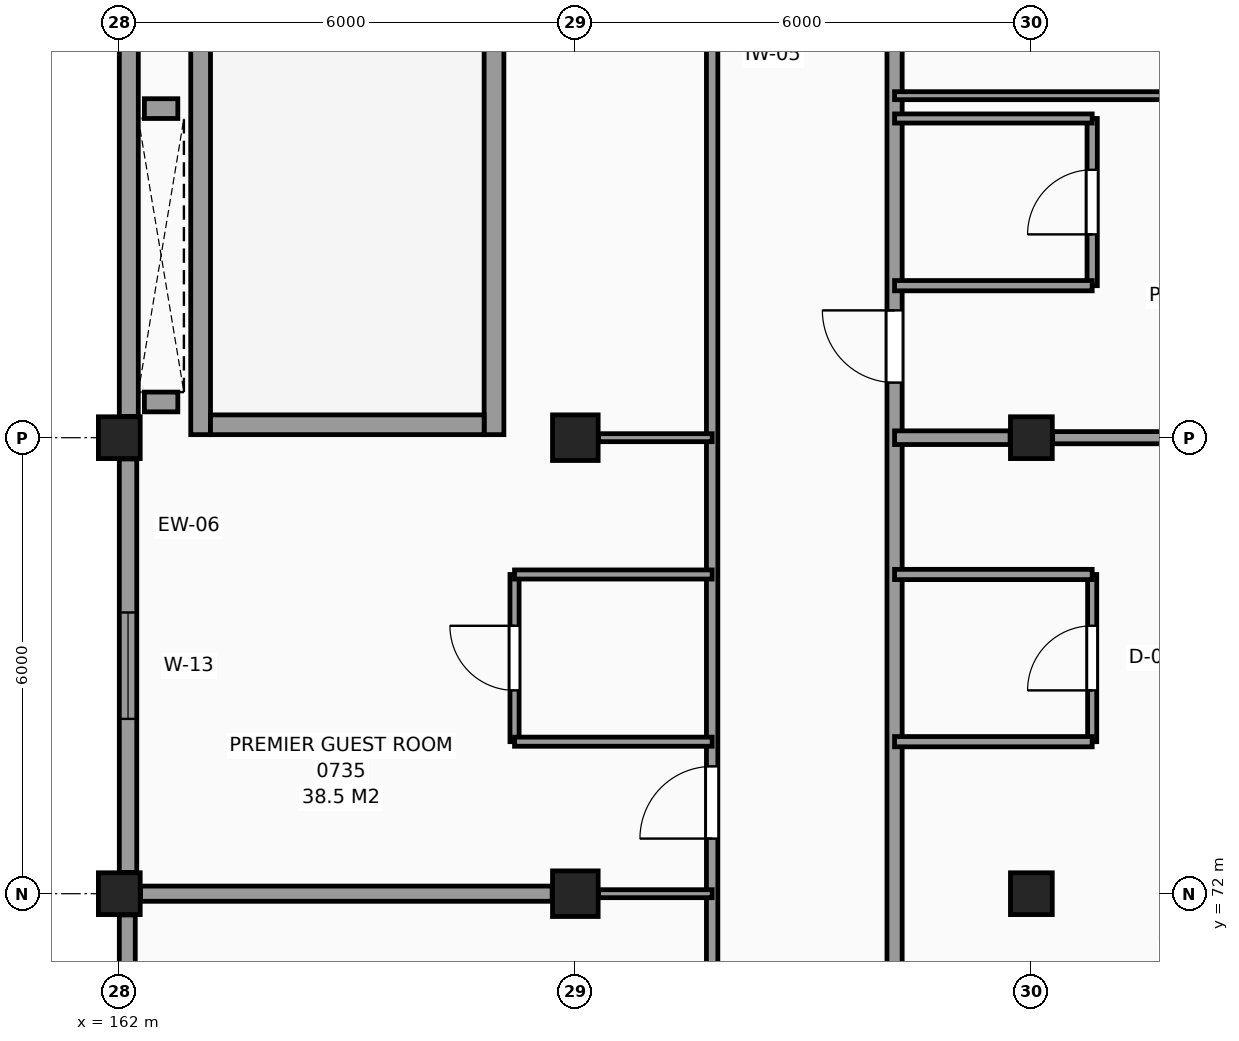
"""IFC4 building model, lengths in metres.
Left out: names, types, materials, properties, quantities, classifications, styles, units other than length and angle.
Written with IfcOpenShell. Run it as: python <this file> out.ifc"""

import sys

from ifc_helpers import new_model, si_unit, direction, frame, frame_2d, origin, origin_2d, place, context, subcontext, project, spatial, rectangle, extrude, element, fill, save


model = new_model("IFC4")
c1 = context("Model", 3, precision=1e-05, world=origin(), true_north=direction((0.0, 1.0)))
c2 = subcontext(c1, "Body", "Model", "MODEL_VIEW")
j1 = project(units=[si_unit("LENGTHUNIT", "METRE"), si_unit("PLANEANGLEUNIT", "RADIAN")], contexts=[c1])
p1 = place(None, origin())
s1 = spatial("IfcSite", under=j1, at=p1, CompositionType="ELEMENT")
p2 = place(p1, origin())
s2 = spatial("IfcBuilding", under=s1, at=p2, CompositionType="ELEMENT")
p3 = place(p2, frame((0.0, 0.0, 31.5)))
s3 = spatial("IfcBuildingStorey", under=s2, at=p3, CompositionType="ELEMENT", Elevation=31.5)
for number, where, z_axis, x_axis in (
    (1, (162.0, 72.0, 0.0), (0.0, 0.0, 1.0), (1.0, 0.0, 0.0)),
    (2, (162.0, 78.0, 0.0), (0.0, 0.0, 1.0), (1.0, 0.0, 0.0)),
):
    element("IfcColumn", number, at=place(p3, frame(where, z_axis=z_axis, x_axis=x_axis)), inside=s3, PredefinedType="COLUMN", context=c2, shape_type="SweptSolid", body=[
        extrude(rectangle(XDim=0.55, YDim=0.55, at=origin_2d()), origin(), (0.0, 0.0, 1.0), 3.3),
    ])
for number, where, z_axis, x_axis in (
    (3, (168.0, 72.0, 0.0), (0.0, 0.0, 1.0), (1.0, 0.0, 0.0)),
    (4, (168.0, 78.0, 0.0), (0.0, 0.0, 1.0), (1.0, 0.0, 0.0)),
):
    element("IfcColumn", number, at=place(p3, frame(where, z_axis=z_axis, x_axis=x_axis)), inside=s3, PredefinedType="COLUMN", context=c2, shape_type="SweptSolid", body=[
        extrude(rectangle(XDim=0.6, YDim=0.6, at=origin_2d()), origin(), (0.0, 0.0, 1.0), 3.3),
    ])
for number, where, z_axis, x_axis in (
    (5, (174.0, 72.0, 0.0), (0.0, 0.0, 1.0), (1.0, 0.0, 0.0)),
    (6, (174.0, 78.0, 0.0), (0.0, 0.0, 1.0), (1.0, 0.0, 0.0)),
):
    element("IfcColumn", number, at=place(p3, frame(where, z_axis=z_axis, x_axis=x_axis)), inside=s3, PredefinedType="COLUMN", context=c2, shape_type="SweptSolid", body=[
        extrude(rectangle(XDim=0.55, YDim=0.55, at=origin_2d()), origin(), (0.0, 0.0, 1.0), 3.3),
    ])
p4 = place(p3, frame((162.125, 83.72, 0.0), z_axis=(0.0, 0.0, 1.0), x_axis=(0.0, -1.0, 0.0)))
e7 = element("IfcWall", 7, at=p4, inside=s3, PredefinedType="SOLIDWALL", context=c2, shape_type="SweptSolid", body=[
    extrude(rectangle(XDim=5.44, YDim=0.25, at=frame_2d((2.72, 0.0))), origin(), (0.0, 0.0, 1.0), 3.07),
])
p5 = place(p3, frame((162.115, 77.72, 0.0), z_axis=(0.0, 0.0, 1.0), x_axis=(0.0, -1.0, 0.0)))
e8 = element("IfcWall", 8, at=p5, inside=s3, PredefinedType="SOLIDWALL", context=c2, shape_type="SweptSolid", body=[
    extrude(rectangle(XDim=5.44, YDim=0.23, at=frame_2d((2.72, 0.0))), origin(), (0.0, 0.0, 1.0), 2.42),
])
p6 = place(p5, frame((2.02, 0.0, 0.8)))
e9 = element("IfcOpeningElement", 9, at=p6, cuts=e8, PredefinedType="OPENING", context=c2, shape_type="SweptSolid", body=[
    extrude(rectangle(XDim=1.4, YDim=1.4, at=frame_2d((0.7, 0.7))), frame((0.0, 0.125, 0.0), z_axis=(0.0, -1.0, 0.0), x_axis=(1.0, 0.0, 0.0)), (0.0, 0.0, 1.0), 0.25),
])
p7 = place(p3, frame((162.105, 71.72, 0.0), z_axis=(0.0, 0.0, 1.0), x_axis=(0.0, -1.0, 0.0)))
e10 = element("IfcWall", 10, at=p7, inside=s3, PredefinedType="SOLIDWALL", context=c2, shape_type="SweptSolid", body=[
    extrude(rectangle(XDim=5.44, YDim=0.21, at=frame_2d((2.72, 0.0))), origin(), (0.0, 0.0, 1.0), 2.42),
])
p8 = place(p7, frame((2.02, 0.0, 0.8)))
e11 = element("IfcOpeningElement", 11, at=p8, cuts=e10, PredefinedType="OPENING", context=c2, shape_type="SweptSolid", body=[
    extrude(rectangle(XDim=1.4, YDim=1.4, at=frame_2d((0.7, 0.7))), frame((0.0, 0.115, 0.0), z_axis=(0.0, -1.0, 0.0), x_axis=(1.0, 0.0, 0.0)), (0.0, 0.0, 1.0), 0.23),
])
for number, where, z_axis, x_axis in (
    (12, (163.07, 78.04, 0.0), (0.0, 0.0, 1.0), (0.0, 1.0, 0.0)),
    (13, (166.93, 78.04, 0.0), (0.0, 0.0, 1.0), (0.0, 1.0, 0.0)),
):
    element("IfcWall", number, at=place(p3, frame(where, z_axis=z_axis, x_axis=x_axis)), inside=s3, PredefinedType="SHEAR", context=c2, shape_type="SweptSolid", body=[
        extrude(rectangle(XDim=10.72, YDim=0.26, at=frame_2d((5.36, 0.0))), origin(), (0.0, 0.0, 1.0), 3.3),
    ])
p9 = place(p3, frame((163.2, 78.17, 0.0), z_axis=(0.0, 0.0, 1.0), x_axis=(1.0, 0.0, 0.0)))
e14 = element("IfcWall", 14, at=p9, inside=s3, PredefinedType="SHEAR", context=c2, shape_type="SweptSolid", body=[
    extrude(rectangle(XDim=3.6, YDim=0.26, at=frame_2d((1.8, 0.0))), origin(), (0.0, 0.0, 1.0), 3.3),
])
for number, where, z_axis, x_axis in (
    (15, (162.33, 78.47, 0.0), (0.0, 0.0, 1.0), (1.0, 0.0, 0.0)),
    (16, (162.33, 82.33, 0.0), (0.0, 0.0, 1.0), (1.0, 0.0, 0.0)),
):
    element("IfcWall", number, at=place(p3, frame(where, z_axis=z_axis, x_axis=x_axis)), inside=s3, PredefinedType="SHEAR", context=c2, shape_type="SweptSolid", body=[
        extrude(rectangle(XDim=0.44, YDim=0.26, at=frame_2d((0.22, 0.0))), origin(), (0.0, 0.0, 1.0), 3.3),
    ])
p10 = place(p3, frame((167.2, 74.0, 0.0), z_axis=(0.0, 0.0, 1.0), x_axis=(0.0, 1.0, 0.0)))
e17 = element("IfcWall", 17, at=p10, inside=s3, PredefinedType="PARTITIONING", context=c2, shape_type="SweptSolid", body=[
    extrude(rectangle(XDim=2.2, YDim=0.12, at=frame_2d((1.1, 0.0))), origin(), (0.0, 0.0, 1.0), 3.07),
])
p11 = place(p10, frame((0.675, 0.0, 0.0)))
e18 = element("IfcOpeningElement", 18, at=p11, cuts=e17, PredefinedType="OPENING", context=c2, shape_type="SweptSolid", body=[
    extrude(rectangle(XDim=0.85, YDim=2.1, at=frame_2d((0.425, 1.05))), frame((0.0, 0.07, 0.0), z_axis=(0.0, -1.0, 0.0), x_axis=(1.0, 0.0, 0.0)), (0.0, 0.0, 1.0), 0.14),
])
p12 = place(p3, frame((169.8, 42.255, 0.0), z_axis=(0.0, 0.0, 1.0), x_axis=(0.0, 1.0, 0.0)))
e19 = element("IfcWall", 19, at=p12, inside=s3, PredefinedType="PARTITIONING", context=c2, shape_type="SweptSolid", body=[
    extrude(rectangle(XDim=65.565, YDim=0.15, at=frame_2d((32.783, 0.0))), origin(), (0.0, 0.0, 1.0), 3.07),
])
p13 = place(p12, frame((50.145, 0.0, 0.0)))
e20 = element("IfcOpeningElement", 20, at=p13, cuts=e19, PredefinedType="OPENING", context=c2, shape_type="SweptSolid", body=[
    extrude(rectangle(XDim=1.2, YDim=2.2, at=frame_2d((0.6, 1.1))), frame((0.0, 0.085, 0.0), z_axis=(0.0, -1.0, 0.0), x_axis=(1.0, 0.0, 0.0)), (0.0, 0.0, 1.0), 0.17),
])
p14 = place(p12, frame((0.42, 0.0, 0.0)))
e21 = element("IfcOpeningElement", 21, at=p14, cuts=e19, PredefinedType="OPENING", context=c2, shape_type="SweptSolid", body=[
    extrude(rectangle(XDim=0.95, YDim=2.1, at=frame_2d((0.475, 1.05))), frame((0.0, 0.085, 0.0), z_axis=(0.0, -1.0, 0.0), x_axis=(1.0, 0.0, 0.0)), (0.0, 0.0, 1.0), 0.17),
])
p15 = place(p12, frame((6.47, 0.0, 0.0)))
e22 = element("IfcOpeningElement", 22, at=p15, cuts=e19, PredefinedType="OPENING", context=c2, shape_type="SweptSolid", body=[
    extrude(rectangle(XDim=0.95, YDim=2.1, at=frame_2d((0.475, 1.05))), frame((0.0, 0.085, 0.0), z_axis=(0.0, -1.0, 0.0), x_axis=(1.0, 0.0, 0.0)), (0.0, 0.0, 1.0), 0.17),
])
p16 = place(p12, frame((12.47, 0.0, 0.0)))
e23 = element("IfcOpeningElement", 23, at=p16, cuts=e19, PredefinedType="OPENING", context=c2, shape_type="SweptSolid", body=[
    extrude(rectangle(XDim=0.95, YDim=2.1, at=frame_2d((0.475, 1.05))), frame((0.0, 0.085, 0.0), z_axis=(0.0, -1.0, 0.0), x_axis=(1.0, 0.0, 0.0)), (0.0, 0.0, 1.0), 0.17),
])
p17 = place(p12, frame((18.47, 0.0, 0.0)))
e24 = element("IfcOpeningElement", 24, at=p17, cuts=e19, PredefinedType="OPENING", context=c2, shape_type="SweptSolid", body=[
    extrude(rectangle(XDim=0.95, YDim=2.1, at=frame_2d((0.475, 1.05))), frame((0.0, 0.085, 0.0), z_axis=(0.0, -1.0, 0.0), x_axis=(1.0, 0.0, 0.0)), (0.0, 0.0, 1.0), 0.17),
])
p18 = place(p12, frame((24.47, 0.0, 0.0)))
e25 = element("IfcOpeningElement", 25, at=p18, cuts=e19, PredefinedType="OPENING", context=c2, shape_type="SweptSolid", body=[
    extrude(rectangle(XDim=0.95, YDim=2.1, at=frame_2d((0.475, 1.05))), frame((0.0, 0.085, 0.0), z_axis=(0.0, -1.0, 0.0), x_axis=(1.0, 0.0, 0.0)), (0.0, 0.0, 1.0), 0.17),
])
p19 = place(p12, frame((30.47, 0.0, 0.0)))
e26 = element("IfcOpeningElement", 26, at=p19, cuts=e19, PredefinedType="OPENING", context=c2, shape_type="SweptSolid", body=[
    extrude(rectangle(XDim=0.95, YDim=2.1, at=frame_2d((0.475, 1.05))), frame((0.0, 0.085, 0.0), z_axis=(0.0, -1.0, 0.0), x_axis=(1.0, 0.0, 0.0)), (0.0, 0.0, 1.0), 0.17),
])
p20 = place(p12, frame((54.47, 0.0, 0.0)))
e27 = element("IfcOpeningElement", 27, at=p20, cuts=e19, PredefinedType="OPENING", context=c2, shape_type="SweptSolid", body=[
    extrude(rectangle(XDim=0.95, YDim=2.1, at=frame_2d((0.475, 1.05))), frame((0.0, 0.085, 0.0), z_axis=(0.0, -1.0, 0.0), x_axis=(1.0, 0.0, 0.0)), (0.0, 0.0, 1.0), 0.17),
])
p21 = place(p12, frame((60.47, 0.0, 0.0)))
e28 = element("IfcOpeningElement", 28, at=p21, cuts=e19, PredefinedType="OPENING", context=c2, shape_type="SweptSolid", body=[
    extrude(rectangle(XDim=0.95, YDim=2.1, at=frame_2d((0.475, 1.05))), frame((0.0, 0.085, 0.0), z_axis=(0.0, -1.0, 0.0), x_axis=(1.0, 0.0, 0.0)), (0.0, 0.0, 1.0), 0.17),
])
p22 = place(p3, frame((172.2, 42.255, 0.0), z_axis=(0.0, 0.0, 1.0), x_axis=(0.0, 1.0, 0.0)))
e29 = element("IfcWall", 29, at=p22, inside=s3, PredefinedType="PARTITIONING", context=c2, shape_type="SweptSolid", body=[
    extrude(rectangle(XDim=65.565, YDim=0.2, at=frame_2d((32.783, 0.0))), origin(), (0.0, 0.0, 1.0), 3.07),
])
p23 = place(p22, frame((0.42, 0.0, 0.0)))
e30 = element("IfcOpeningElement", 30, at=p23, cuts=e29, PredefinedType="OPENING", context=c2, shape_type="SweptSolid", body=[
    extrude(rectangle(XDim=0.95, YDim=2.1, at=frame_2d((0.475, 1.05))), frame((0.0, 0.11, 0.0), z_axis=(0.0, -1.0, 0.0), x_axis=(1.0, 0.0, 0.0)), (0.0, 0.0, 1.0), 0.22),
])
p24 = place(p22, frame((6.47, 0.0, 0.0)))
e31 = element("IfcOpeningElement", 31, at=p24, cuts=e29, PredefinedType="OPENING", context=c2, shape_type="SweptSolid", body=[
    extrude(rectangle(XDim=0.95, YDim=2.1, at=frame_2d((0.475, 1.05))), frame((0.0, 0.11, 0.0), z_axis=(0.0, -1.0, 0.0), x_axis=(1.0, 0.0, 0.0)), (0.0, 0.0, 1.0), 0.22),
])
p25 = place(p22, frame((16.27, 0.0, 0.0)))
e32 = element("IfcOpeningElement", 32, at=p25, cuts=e29, PredefinedType="OPENING", context=c2, shape_type="SweptSolid", body=[
    extrude(rectangle(XDim=0.95, YDim=2.1, at=frame_2d((0.475, 1.05))), frame((0.0, 0.11, 0.0), z_axis=(0.0, -1.0, 0.0), x_axis=(1.0, 0.0, 0.0)), (0.0, 0.0, 1.0), 0.22),
])
p26 = place(p22, frame((18.47, 0.0, 0.0)))
e33 = element("IfcOpeningElement", 33, at=p26, cuts=e29, PredefinedType="OPENING", context=c2, shape_type="SweptSolid", body=[
    extrude(rectangle(XDim=0.95, YDim=2.1, at=frame_2d((0.475, 1.05))), frame((0.0, 0.11, 0.0), z_axis=(0.0, -1.0, 0.0), x_axis=(1.0, 0.0, 0.0)), (0.0, 0.0, 1.0), 0.22),
])
p27 = place(p22, frame((22.87, 0.0, 0.0)))
e34 = element("IfcOpeningElement", 34, at=p27, cuts=e29, PredefinedType="OPENING", context=c2, shape_type="SweptSolid", body=[
    extrude(rectangle(XDim=0.95, YDim=2.1, at=frame_2d((0.475, 1.05))), frame((0.0, 0.11, 0.0), z_axis=(0.0, -1.0, 0.0), x_axis=(1.0, 0.0, 0.0)), (0.0, 0.0, 1.0), 0.22),
])
p28 = place(p22, frame((27.37, 0.0, 0.0)))
e35 = element("IfcOpeningElement", 35, at=p28, cuts=e29, PredefinedType="OPENING", context=c2, shape_type="SweptSolid", body=[
    extrude(rectangle(XDim=0.95, YDim=2.1, at=frame_2d((0.475, 1.05))), frame((0.0, 0.11, 0.0), z_axis=(0.0, -1.0, 0.0), x_axis=(1.0, 0.0, 0.0)), (0.0, 0.0, 1.0), 0.22),
])
p29 = place(p22, frame((36.47, 0.0, 0.0)))
e36 = element("IfcOpeningElement", 36, at=p29, cuts=e29, PredefinedType="OPENING", context=c2, shape_type="SweptSolid", body=[
    extrude(rectangle(XDim=0.95, YDim=2.1, at=frame_2d((0.475, 1.05))), frame((0.0, 0.11, 0.0), z_axis=(0.0, -1.0, 0.0), x_axis=(1.0, 0.0, 0.0)), (0.0, 0.0, 1.0), 0.22),
])
p30 = place(p22, frame((40.87, 0.0, 0.0)))
e37 = element("IfcOpeningElement", 37, at=p30, cuts=e29, PredefinedType="OPENING", context=c2, shape_type="SweptSolid", body=[
    extrude(rectangle(XDim=0.95, YDim=2.1, at=frame_2d((0.475, 1.05))), frame((0.0, 0.11, 0.0), z_axis=(0.0, -1.0, 0.0), x_axis=(1.0, 0.0, 0.0)), (0.0, 0.0, 1.0), 0.22),
])
p31 = place(p22, frame((48.07, 0.0, 0.0)))
e38 = element("IfcOpeningElement", 38, at=p31, cuts=e29, PredefinedType="OPENING", context=c2, shape_type="SweptSolid", body=[
    extrude(rectangle(XDim=0.95, YDim=2.1, at=frame_2d((0.475, 1.05))), frame((0.0, 0.11, 0.0), z_axis=(0.0, -1.0, 0.0), x_axis=(1.0, 0.0, 0.0)), (0.0, 0.0, 1.0), 0.22),
])
p32 = place(p22, frame((56.32, 0.0, 0.0)))
e39 = element("IfcOpeningElement", 39, at=p32, cuts=e29, PredefinedType="OPENING", context=c2, shape_type="SweptSolid", body=[
    extrude(rectangle(XDim=0.95, YDim=2.1, at=frame_2d((0.475, 1.05))), frame((0.0, 0.11, 0.0), z_axis=(0.0, -1.0, 0.0), x_axis=(1.0, 0.0, 0.0)), (0.0, 0.0, 1.0), 0.22),
])
p33 = place(p22, frame((60.47, 0.0, 0.0)))
e40 = element("IfcOpeningElement", 40, at=p33, cuts=e29, PredefinedType="OPENING", context=c2, shape_type="SweptSolid", body=[
    extrude(rectangle(XDim=0.95, YDim=2.1, at=frame_2d((0.475, 1.05))), frame((0.0, 0.11, 0.0), z_axis=(0.0, -1.0, 0.0), x_axis=(1.0, 0.0, 0.0)), (0.0, 0.0, 1.0), 0.22),
])
p34 = place(p3, frame((174.8, 74.0, 0.0), z_axis=(0.0, 0.0, 1.0), x_axis=(0.0, 1.0, 0.0)))
e41 = element("IfcWall", 41, at=p34, inside=s3, PredefinedType="PARTITIONING", context=c2, shape_type="SweptSolid", body=[
    extrude(rectangle(XDim=2.2, YDim=0.12, at=frame_2d((1.1, 0.0))), origin(), (0.0, 0.0, 1.0), 3.07),
])
p35 = place(p34, frame((0.675, 0.0, 0.0)))
e42 = element("IfcOpeningElement", 42, at=p35, cuts=e41, PredefinedType="OPENING", context=c2, shape_type="SweptSolid", body=[
    extrude(rectangle(XDim=0.85, YDim=2.1, at=frame_2d((0.425, 1.05))), frame((0.0, 0.07, 0.0), z_axis=(0.0, -1.0, 0.0), x_axis=(1.0, 0.0, 0.0)), (0.0, 0.0, 1.0), 0.14),
])
p36 = place(p3, frame((174.8, 80.0, 0.0), z_axis=(0.0, 0.0, 1.0), x_axis=(0.0, 1.0, 0.0)))
e43 = element("IfcWall", 43, at=p36, inside=s3, PredefinedType="PARTITIONING", context=c2, shape_type="SweptSolid", body=[
    extrude(rectangle(XDim=2.2, YDim=0.135, at=frame_2d((1.1, 0.0))), origin(), (0.0, 0.0, 1.0), 3.07),
])
p37 = place(p36, frame((0.675, 0.0, 0.0)))
e44 = element("IfcOpeningElement", 44, at=p37, cuts=e43, PredefinedType="OPENING", context=c2, shape_type="SweptSolid", body=[
    extrude(rectangle(XDim=0.85, YDim=2.1, at=frame_2d((0.425, 1.05))), frame((0.0, 0.078, 0.0), z_axis=(0.0, -1.0, 0.0), x_axis=(1.0, 0.0, 0.0)), (0.0, 0.0, 1.0), 0.155),
])
p38 = place(p3, frame((162.28, 72.0, 0.0), z_axis=(0.0, 0.0, 1.0), x_axis=(1.0, 0.0, 0.0)))
e45 = element("IfcWall", 45, at=p38, inside=s3, PredefinedType="PARTITIONING", context=c2, shape_type="SweptSolid", body=[
    extrude(rectangle(XDim=5.415, YDim=0.2, at=frame_2d((2.708, 0.0))), origin(), (0.0, 0.0, 1.0), 2.27),
])
p39 = place(p3, frame((168.305, 72.0, 0.0), z_axis=(0.0, 0.0, 1.0), x_axis=(1.0, 0.0, 0.0)))
e46 = element("IfcWall", 46, at=p39, inside=s3, PredefinedType="PARTITIONING", context=c2, shape_type="SweptSolid", body=[
    extrude(rectangle(XDim=1.495, YDim=0.105, at=frame_2d((0.748, 0.0))), origin(), (0.0, 0.0, 1.0), 2.27),
])
p40 = place(p3, frame((167.2, 74.0, 0.0), z_axis=(0.0, 0.0, 1.0), x_axis=(1.0, 0.0, 0.0)))
e47 = element("IfcWall", 47, at=p40, inside=s3, PredefinedType="PARTITIONING", context=c2, shape_type="SweptSolid", body=[
    extrude(rectangle(XDim=2.6, YDim=0.12, at=frame_2d((1.3, 0.0))), origin(), (0.0, 0.0, 1.0), 3.07),
])
p41 = place(p3, frame((172.2, 74.0, 0.0), z_axis=(0.0, 0.0, 1.0), x_axis=(1.0, 0.0, 0.0)))
e48 = element("IfcWall", 48, at=p41, inside=s3, PredefinedType="PARTITIONING", context=c2, shape_type="SweptSolid", body=[
    extrude(rectangle(XDim=2.6, YDim=0.135, at=frame_2d((1.3, 0.0))), origin(), (0.0, 0.0, 1.0), 3.07),
])
p42 = place(p3, frame((167.2, 76.2, 0.0), z_axis=(0.0, 0.0, 1.0), x_axis=(1.0, 0.0, 0.0)))
e49 = element("IfcWall", 49, at=p42, inside=s3, PredefinedType="PARTITIONING", context=c2, shape_type="SweptSolid", body=[
    extrude(rectangle(XDim=2.6, YDim=0.12, at=frame_2d((1.3, 0.0))), origin(), (0.0, 0.0, 1.0), 3.07),
])
p43 = place(p3, frame((172.2, 76.2, 0.0), z_axis=(0.0, 0.0, 1.0), x_axis=(1.0, 0.0, 0.0)))
e50 = element("IfcWall", 50, at=p43, inside=s3, PredefinedType="PARTITIONING", context=c2, shape_type="SweptSolid", body=[
    extrude(rectangle(XDim=2.6, YDim=0.135, at=frame_2d((1.3, 0.0))), origin(), (0.0, 0.0, 1.0), 3.07),
])
p44 = place(p3, frame((168.305, 78.0, 0.0), z_axis=(0.0, 0.0, 1.0), x_axis=(1.0, 0.0, 0.0)))
e51 = element("IfcWall", 51, at=p44, inside=s3, PredefinedType="PARTITIONING", context=c2, shape_type="SweptSolid", body=[
    extrude(rectangle(XDim=1.495, YDim=0.105, at=frame_2d((0.748, 0.0))), origin(), (0.0, 0.0, 1.0), 2.27),
])
p45 = place(p3, frame((172.2, 78.0, 0.0), z_axis=(0.0, 0.0, 1.0), x_axis=(1.0, 0.0, 0.0)))
e52 = element("IfcWall", 52, at=p45, inside=s3, PredefinedType="PARTITIONING", context=c2, shape_type="SweptSolid", body=[
    extrude(rectangle(XDim=1.52, YDim=0.18, at=frame_2d((0.76, 0.0))), origin(), (0.0, 0.0, 1.0), 2.27),
])
p46 = place(p3, frame((174.28, 78.0, 0.0), z_axis=(0.0, 0.0, 1.0), x_axis=(1.0, 0.0, 0.0)))
e53 = element("IfcWall", 53, at=p46, inside=s3, PredefinedType="PARTITIONING", context=c2, shape_type="SweptSolid", body=[
    extrude(rectangle(XDim=5.415, YDim=0.16, at=frame_2d((2.708, 0.0))), origin(), (0.0, 0.0, 1.0), 2.27),
])
p47 = place(p3, frame((172.2, 80.0, 0.0), z_axis=(0.0, 0.0, 1.0), x_axis=(1.0, 0.0, 0.0)))
e54 = element("IfcWall", 54, at=p47, inside=s3, PredefinedType="PARTITIONING", context=c2, shape_type="SweptSolid", body=[
    extrude(rectangle(XDim=2.6, YDim=0.135, at=frame_2d((1.3, 0.0))), origin(), (0.0, 0.0, 1.0), 3.07),
])
p48 = place(p3, frame((172.2, 82.2, 0.0), z_axis=(0.0, 0.0, 1.0), x_axis=(1.0, 0.0, 0.0)))
e55 = element("IfcWall", 55, at=p48, inside=s3, PredefinedType="PARTITIONING", context=c2, shape_type="SweptSolid", body=[
    extrude(rectangle(XDim=2.6, YDim=0.12, at=frame_2d((1.3, 0.0))), origin(), (0.0, 0.0, 1.0), 3.07),
])
p49 = place(p3, frame((172.2, 82.5, 0.0), z_axis=(0.0, 0.0, 1.0), x_axis=(1.0, 0.0, 0.0)))
e56 = element("IfcWall", 56, at=p49, inside=s3, PredefinedType="PARTITIONING", context=c2, shape_type="SweptSolid", body=[
    extrude(rectangle(XDim=7.585, YDim=0.105, at=frame_2d((3.792, 0.0))), origin(), (0.0, 0.0, 1.0), 3.07),
])
p50 = place(p6, origin())
e57 = element("IfcWindow", 57, at=p50, inside=s3, PartitioningType="SINGLE_PANEL", PredefinedType="WINDOW", context=c2, shape_type="SweptSolid", body=[
    extrude(rectangle(XDim=1.4, YDim=1.4, at=frame_2d((0.7, 0.7))), frame((0.0, 0.03, 0.0), z_axis=(0.0, -1.0, 0.0), x_axis=(1.0, 0.0, 0.0)), (0.0, 0.0, 1.0), 0.06),
])
fill(e9, e57)
p51 = place(p35, origin())
e58 = element("IfcDoor", 58, at=p51, inside=s3, OperationType="SINGLE_SWING_LEFT", PredefinedType="DOOR", context=c2, shape_type="SweptSolid", body=[
    extrude(rectangle(XDim=0.85, YDim=2.1, at=frame_2d((0.425, 1.05))), frame((0.0, 0.025, 0.0), z_axis=(0.0, -1.0, 0.0), x_axis=(1.0, 0.0, 0.0)), (0.0, 0.0, 1.0), 0.05),
])
fill(e42, e58)
p52 = place(p37, origin())
e59 = element("IfcDoor", 59, at=p52, inside=s3, OperationType="SINGLE_SWING_LEFT", PredefinedType="DOOR", context=c2, shape_type="SweptSolid", body=[
    extrude(rectangle(XDim=0.85, YDim=2.1, at=frame_2d((0.425, 1.05))), frame((0.0, 0.025, 0.0), z_axis=(0.0, -1.0, 0.0), x_axis=(1.0, 0.0, 0.0)), (0.0, 0.0, 1.0), 0.05),
])
fill(e44, e59)
p53 = place(p29, origin())
e60 = element("IfcDoor", 60, at=p53, inside=s3, OperationType="SINGLE_SWING_RIGHT", PredefinedType="DOOR", context=c2, shape_type="SweptSolid", body=[
    extrude(rectangle(XDim=0.95, YDim=2.1, at=frame_2d((0.475, 1.05))), frame((0.0, 0.025, 0.0), z_axis=(0.0, -1.0, 0.0), x_axis=(1.0, 0.0, 0.0)), (0.0, 0.0, 1.0), 0.05),
])
fill(e36, e60)
p54 = place(p11, origin())
e61 = element("IfcDoor", 61, at=p54, inside=s3, OperationType="SINGLE_SWING_RIGHT", PredefinedType="DOOR", context=c2, shape_type="SweptSolid", body=[
    extrude(rectangle(XDim=0.85, YDim=2.1, at=frame_2d((0.425, 1.05))), frame((0.0, 0.025, 0.0), z_axis=(0.0, -1.0, 0.0), x_axis=(1.0, 0.0, 0.0)), (0.0, 0.0, 1.0), 0.05),
])
fill(e18, e61)
p55 = place(p19, origin())
e62 = element("IfcDoor", 62, at=p55, inside=s3, OperationType="SINGLE_SWING_LEFT", PredefinedType="DOOR", context=c2, shape_type="SweptSolid", body=[
    extrude(rectangle(XDim=0.95, YDim=2.1, at=frame_2d((0.475, 1.05))), frame((0.0, 0.025, 0.0), z_axis=(0.0, -1.0, 0.0), x_axis=(1.0, 0.0, 0.0)), (0.0, 0.0, 1.0), 0.05),
])
fill(e26, e62)
save(model, sys.argv[1])
